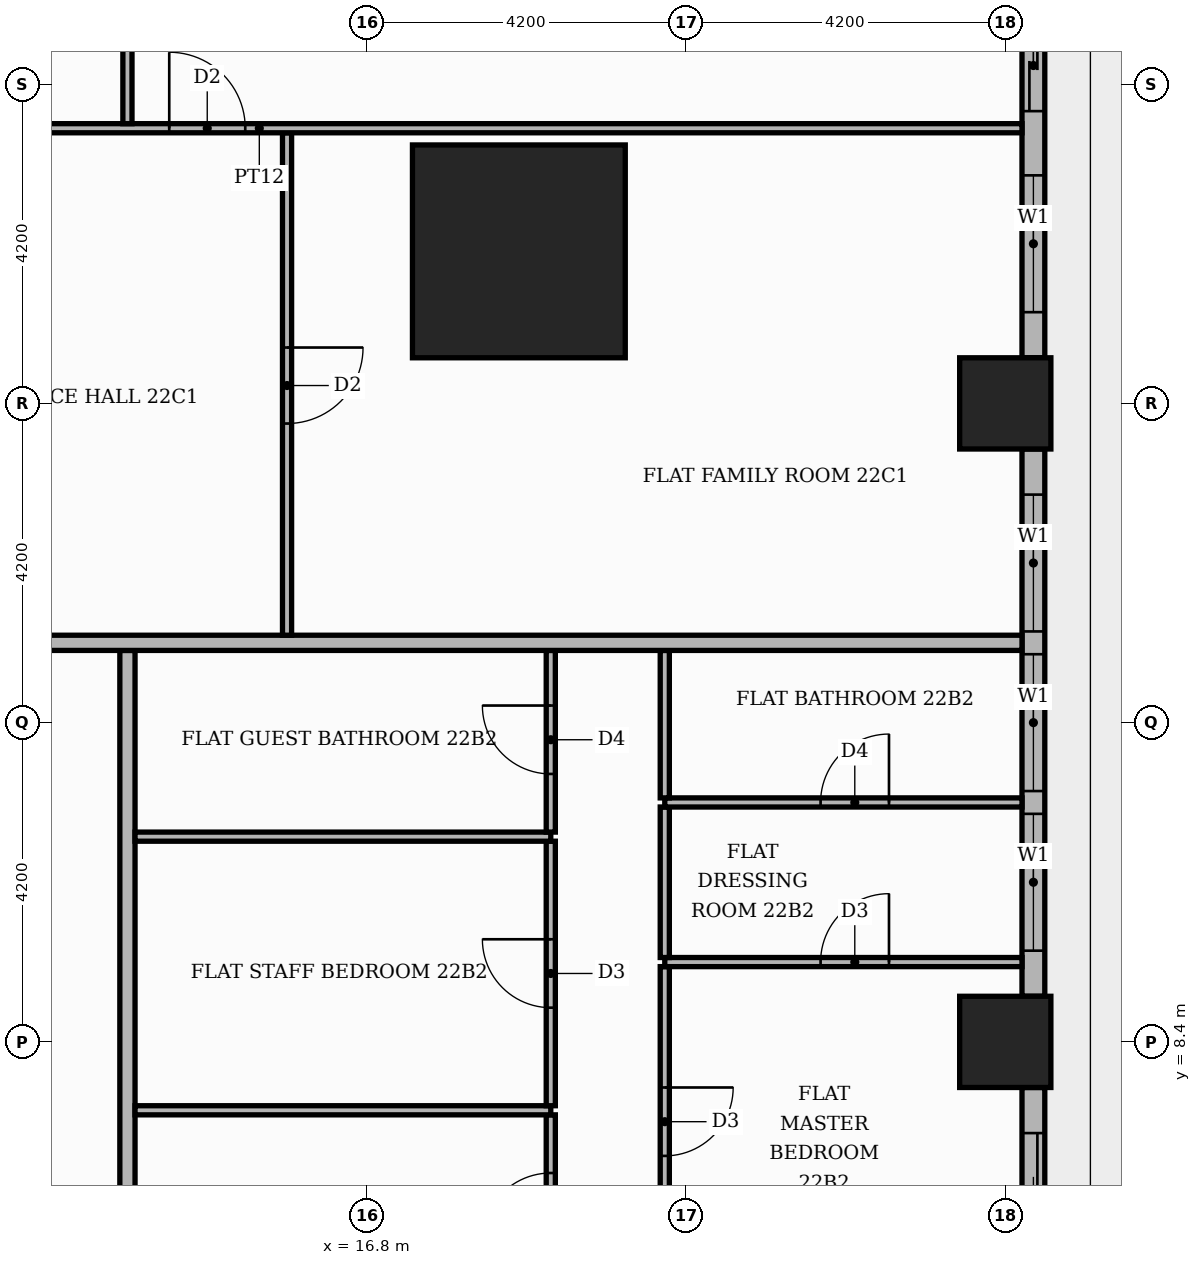
"""IFC4 building model, lengths in metres.
Left out: names, types, materials, properties, quantities, classifications, styles, units other than length and angle.
Written with IfcOpenShell. Run it as: python <this file> out.ifc"""

import sys

from ifc_helpers import new_model, si_unit, direction, frame, frame_2d, origin, origin_2d, place, context, subcontext, project, spatial, rectangle, extrude, element, fill, save


model = new_model("IFC4")
c1 = context("Model", 3, precision=1e-05, world=origin(), true_north=direction((0.0, 1.0)))
c2 = subcontext(c1, "Body", "Model", "MODEL_VIEW")
j1 = project(units=[si_unit("LENGTHUNIT", "METRE"), si_unit("PLANEANGLEUNIT", "RADIAN")], contexts=[c1])
p1 = place(None, origin())
s1 = spatial("IfcSite", under=j1, at=p1, CompositionType="ELEMENT")
p2 = place(p1, origin())
s2 = spatial("IfcBuilding", under=s1, at=p2, CompositionType="ELEMENT")
p3 = place(p2, frame((0.0, 0.0, 94.8)))
s3 = spatial("IfcBuildingStorey", under=s2, at=p3, CompositionType="ELEMENT", Elevation=94.8)
p4 = place(p3, frame((18.8, 18.8, 0.0), z_axis=(0.0, 0.0, 1.0), x_axis=(1.0, 0.0, 0.0)))
e1 = element("IfcColumn", 1, at=p4, inside=s3, PredefinedType="COLUMN", context=c2, shape_type="SweptSolid", body=[
    extrude(rectangle(XDim=2.8, YDim=2.8, at=origin_2d()), origin(), (0.0, 0.0, 1.0), 3.9),
])
for number, where, z_axis, x_axis in (
    (2, (25.2, 8.4, 0.0), (0.0, 0.0, 1.0), (1.0, 0.0, 0.0)),
    (3, (25.2, 16.8, 0.0), (0.0, 0.0, 1.0), (1.0, 0.0, 0.0)),
):
    element("IfcColumn", number, at=place(p3, frame(where, z_axis=z_axis, x_axis=x_axis)), inside=s3, PredefinedType="COLUMN", context=c2, shape_type="SweptSolid", body=[
        extrude(rectangle(XDim=1.2, YDim=1.2, at=origin_2d()), origin(), (0.0, 0.0, 1.0), 3.9),
    ])
p5 = place(p3, frame((25.57, 0.6, 0.0), z_axis=(0.0, 0.0, 1.0), x_axis=(0.0, 1.0, 0.0)))
e4 = element("IfcWall", 4, at=p5, inside=s3, PredefinedType="STANDARD", context=c2, shape_type="SweptSolid", body=[
    extrude(rectangle(XDim=7.2, YDim=0.3, at=frame_2d((3.6, 0.0))), origin(), (0.0, 0.0, 1.0), 3.48),
])
p6 = place(p5, frame((0.6, 0.0, 0.9)))
e5 = element("IfcOpeningElement", 5, at=p6, cuts=e4, PredefinedType="OPENING", context=c2, shape_type="SweptSolid", body=[
    extrude(rectangle(XDim=1.8, YDim=2.1, at=frame_2d((0.9, 1.05))), frame((0.0, 0.16, 0.0), z_axis=(0.0, -1.0, 0.0), x_axis=(1.0, 0.0, 0.0)), (0.0, 0.0, 1.0), 0.32),
])
p7 = place(p5, frame((2.7, 0.0, 0.9)))
e6 = element("IfcOpeningElement", 6, at=p7, cuts=e4, PredefinedType="OPENING", context=c2, shape_type="SweptSolid", body=[
    extrude(rectangle(XDim=1.8, YDim=2.1, at=frame_2d((0.9, 1.05))), frame((0.0, 0.16, 0.0), z_axis=(0.0, -1.0, 0.0), x_axis=(1.0, 0.0, 0.0)), (0.0, 0.0, 1.0), 0.32),
])
p8 = place(p5, frame((4.8, 0.0, 0.0)))
e7 = element("IfcOpeningElement", 7, at=p8, cuts=e4, PredefinedType="OPENING", context=c2, shape_type="SweptSolid", body=[
    extrude(rectangle(XDim=1.8, YDim=2.4, at=frame_2d((0.9, 1.2))), frame((0.0, 0.16, 0.0), z_axis=(0.0, -1.0, 0.0), x_axis=(1.0, 0.0, 0.0)), (0.0, 0.0, 1.0), 0.32),
])
p9 = place(p3, frame((25.57, 9.0, 0.0), z_axis=(0.0, 0.0, 1.0), x_axis=(0.0, 1.0, 0.0)))
e8 = element("IfcWall", 8, at=p9, inside=s3, PredefinedType="STANDARD", context=c2, shape_type="SweptSolid", body=[
    extrude(rectangle(XDim=7.2, YDim=0.3, at=frame_2d((3.6, 0.0))), origin(), (0.0, 0.0, 1.0), 3.48),
])
p10 = place(p9, frame((0.6, 0.0, 0.9)))
e9 = element("IfcOpeningElement", 9, at=p10, cuts=e8, PredefinedType="OPENING", context=c2, shape_type="SweptSolid", body=[
    extrude(rectangle(XDim=1.8, YDim=2.1, at=frame_2d((0.9, 1.05))), frame((0.0, 0.16, 0.0), z_axis=(0.0, -1.0, 0.0), x_axis=(1.0, 0.0, 0.0)), (0.0, 0.0, 1.0), 0.32),
])
p11 = place(p9, frame((2.7, 0.0, 0.9)))
e10 = element("IfcOpeningElement", 10, at=p11, cuts=e8, PredefinedType="OPENING", context=c2, shape_type="SweptSolid", body=[
    extrude(rectangle(XDim=1.8, YDim=2.1, at=frame_2d((0.9, 1.05))), frame((0.0, 0.16, 0.0), z_axis=(0.0, -1.0, 0.0), x_axis=(1.0, 0.0, 0.0)), (0.0, 0.0, 1.0), 0.32),
])
p12 = place(p9, frame((4.8, 0.0, 0.9)))
e11 = element("IfcOpeningElement", 11, at=p12, cuts=e8, PredefinedType="OPENING", context=c2, shape_type="SweptSolid", body=[
    extrude(rectangle(XDim=1.8, YDim=2.1, at=frame_2d((0.9, 1.05))), frame((0.0, 0.16, 0.0), z_axis=(0.0, -1.0, 0.0), x_axis=(1.0, 0.0, 0.0)), (0.0, 0.0, 1.0), 0.32),
])
p13 = place(p3, frame((25.57, 17.4, 0.0), z_axis=(0.0, 0.0, 1.0), x_axis=(0.0, 1.0, 0.0)))
e12 = element("IfcWall", 12, at=p13, inside=s3, PredefinedType="STANDARD", context=c2, shape_type="SweptSolid", body=[
    extrude(rectangle(XDim=4.82, YDim=0.3, at=frame_2d((2.41, 0.0))), origin(), (0.0, 0.0, 1.0), 3.48),
])
p14 = place(p13, frame((0.6, 0.0, 0.9)))
e13 = element("IfcOpeningElement", 13, at=p14, cuts=e12, PredefinedType="OPENING", context=c2, shape_type="SweptSolid", body=[
    extrude(rectangle(XDim=1.8, YDim=2.1, at=frame_2d((0.9, 1.05))), frame((0.0, 0.16, 0.0), z_axis=(0.0, -1.0, 0.0), x_axis=(1.0, 0.0, 0.0)), (0.0, 0.0, 1.0), 0.32),
])
p15 = place(p13, frame((3.245, 0.0, 0.0)))
e14 = element("IfcOpeningElement", 14, at=p15, cuts=e12, PredefinedType="OPENING", context=c2, shape_type="SweptSolid", body=[
    extrude(rectangle(XDim=1.2, YDim=2.4, at=frame_2d((0.6, 1.2))), frame((0.0, 0.16, 0.0), z_axis=(0.0, -1.0, 0.0), x_axis=(1.0, 0.0, 0.0)), (0.0, 0.0, 1.0), 0.32),
])
p16 = place(p3, frame((13.65, -5.15, 0.0), z_axis=(0.0, 0.0, 1.0), x_axis=(0.0, 1.0, 0.0)))
e15 = element("IfcWall", 15, at=p16, inside=s3, PredefinedType="PARTITIONING", context=c2, shape_type="SweptSolid", body=[
    extrude(rectangle(XDim=18.7, YDim=0.2, at=frame_2d((9.35, 0.0))), origin(), (0.0, 0.0, 1.0), 3.48),
])
p17 = place(p16, frame((1.45, 0.0, 0.0)))
e16 = element("IfcOpeningElement", 16, at=p17, cuts=e15, PredefinedType="OPENING", context=c2, shape_type="SweptSolid", body=[
    extrude(rectangle(XDim=1.1, YDim=2.4, at=frame_2d((0.55, 1.2))), frame((0.0, 0.11, 0.0), z_axis=(0.0, -1.0, 0.0), x_axis=(1.0, 0.0, 0.0)), (0.0, 0.0, 1.0), 0.22),
])
p18 = place(p3, frame((19.22, 5.01, 0.0), z_axis=(0.0, 0.0, 1.0), x_axis=(0.0, 1.0, 0.0)))
e17 = element("IfcWall", 17, at=p18, inside=s3, PredefinedType="PARTITIONING", context=c2, shape_type="SweptSolid", body=[
    extrude(rectangle(XDim=2.43, YDim=0.12, at=frame_2d((1.215, 0.0))), origin(), (0.0, 0.0, 1.0), 3.48),
])
p19 = place(p18, frame((0.765, 0.0, 0.0)))
e18 = element("IfcOpeningElement", 18, at=p19, cuts=e17, PredefinedType="OPENING", context=c2, shape_type="SweptSolid", body=[
    extrude(rectangle(XDim=0.9, YDim=2.1, at=frame_2d((0.45, 1.05))), frame((0.0, 0.07, 0.0), z_axis=(0.0, -1.0, 0.0), x_axis=(1.0, 0.0, 0.0)), (0.0, 0.0, 1.0), 0.14),
])
p20 = place(p3, frame((20.72, 5.31, 0.0), z_axis=(0.0, 0.0, 1.0), x_axis=(0.0, 1.0, 0.0)))
e19 = element("IfcWall", 19, at=p20, inside=s3, PredefinedType="PARTITIONING", context=c2, shape_type="SweptSolid", body=[
    extrude(rectangle(XDim=4.08, YDim=0.12, at=frame_2d((2.04, 0.0))), origin(), (0.0, 0.0, 1.0), 3.48),
])
p21 = place(p20, frame((1.59, 0.0, 0.0)))
e20 = element("IfcOpeningElement", 20, at=p21, cuts=e19, PredefinedType="OPENING", context=c2, shape_type="SweptSolid", body=[
    extrude(rectangle(XDim=0.9, YDim=2.1, at=frame_2d((0.45, 1.05))), frame((0.0, 0.07, 0.0), z_axis=(0.0, -1.0, 0.0), x_axis=(1.0, 0.0, 0.0)), (0.0, 0.0, 1.0), 0.14),
])
p22 = place(p3, frame((13.75, 7.5, 0.0), z_axis=(0.0, 0.0, 1.0), x_axis=(1.0, 0.0, 0.0)))
e21 = element("IfcWall", 21, at=p22, inside=s3, PredefinedType="PARTITIONING", context=c2, shape_type="SweptSolid", body=[
    extrude(rectangle(XDim=5.47, YDim=0.12, at=frame_2d((2.735, 0.0))), origin(), (0.0, 0.0, 1.0), 3.48),
])
p23 = place(p3, frame((19.22, 7.56, 0.0), z_axis=(0.0, 0.0, 1.0), x_axis=(0.0, 1.0, 0.0)))
e22 = element("IfcWall", 22, at=p23, inside=s3, PredefinedType="PARTITIONING", context=c2, shape_type="SweptSolid", body=[
    extrude(rectangle(XDim=3.48, YDim=0.12, at=frame_2d((1.74, 0.0))), origin(), (0.0, 0.0, 1.0), 3.48),
])
p24 = place(p23, frame((1.29, 0.0, 0.0)))
e23 = element("IfcOpeningElement", 23, at=p24, cuts=e22, PredefinedType="OPENING", context=c2, shape_type="SweptSolid", body=[
    extrude(rectangle(XDim=0.9, YDim=2.1, at=frame_2d((0.45, 1.05))), frame((0.0, 0.07, 0.0), z_axis=(0.0, -1.0, 0.0), x_axis=(1.0, 0.0, 0.0)), (0.0, 0.0, 1.0), 0.14),
])
p25 = place(p3, frame((20.72, 9.45, 0.0), z_axis=(0.0, 0.0, 1.0), x_axis=(1.0, 0.0, 0.0)))
e24 = element("IfcWall", 24, at=p25, inside=s3, PredefinedType="PARTITIONING", context=c2, shape_type="SweptSolid", body=[
    extrude(rectangle(XDim=4.7, YDim=0.12, at=frame_2d((2.35, 0.0))), origin(), (0.0, 0.0, 1.0), 3.48),
])
p26 = place(p25, frame((2.05, 0.0, 0.0)))
e25 = element("IfcOpeningElement", 25, at=p26, cuts=e24, PredefinedType="OPENING", context=c2, shape_type="SweptSolid", body=[
    extrude(rectangle(XDim=0.9, YDim=2.1, at=frame_2d((0.45, 1.05))), frame((0.0, 0.07, 0.0), z_axis=(0.0, -1.0, 0.0), x_axis=(1.0, 0.0, 0.0)), (0.0, 0.0, 1.0), 0.14),
])
p27 = place(p3, frame((20.72, 9.51, 0.0), z_axis=(0.0, 0.0, 1.0), x_axis=(0.0, 1.0, 0.0)))
e26 = element("IfcWall", 26, at=p27, inside=s3, PredefinedType="PARTITIONING", context=c2, shape_type="SweptSolid", body=[
    extrude(rectangle(XDim=1.98, YDim=0.12, at=frame_2d((0.99, 0.0))), origin(), (0.0, 0.0, 1.0), 3.48),
])
p28 = place(p3, frame((13.75, 11.1, 0.0), z_axis=(0.0, 0.0, 1.0), x_axis=(1.0, 0.0, 0.0)))
e27 = element("IfcWall", 27, at=p28, inside=s3, PredefinedType="PARTITIONING", context=c2, shape_type="SweptSolid", body=[
    extrude(rectangle(XDim=5.47, YDim=0.12, at=frame_2d((2.735, 0.0))), origin(), (0.0, 0.0, 1.0), 3.48),
])
p29 = place(p3, frame((19.22, 11.16, 0.0), z_axis=(0.0, 0.0, 1.0), x_axis=(0.0, 1.0, 0.0)))
e28 = element("IfcWall", 28, at=p29, inside=s3, PredefinedType="PARTITIONING", context=c2, shape_type="SweptSolid", body=[
    extrude(rectangle(XDim=2.39, YDim=0.12, at=frame_2d((1.195, 0.0))), origin(), (0.0, 0.0, 1.0), 3.48),
])
p30 = place(p29, frame((0.765, 0.0, 0.0)))
e29 = element("IfcOpeningElement", 29, at=p30, cuts=e28, PredefinedType="OPENING", context=c2, shape_type="SweptSolid", body=[
    extrude(rectangle(XDim=0.9, YDim=2.1, at=frame_2d((0.45, 1.05))), frame((0.0, 0.07, 0.0), z_axis=(0.0, -1.0, 0.0), x_axis=(1.0, 0.0, 0.0)), (0.0, 0.0, 1.0), 0.14),
])
p31 = place(p3, frame((20.72, 11.55, 0.0), z_axis=(0.0, 0.0, 1.0), x_axis=(1.0, 0.0, 0.0)))
e30 = element("IfcWall", 30, at=p31, inside=s3, PredefinedType="PARTITIONING", context=c2, shape_type="SweptSolid", body=[
    extrude(rectangle(XDim=4.7, YDim=0.12, at=frame_2d((2.35, 0.0))), origin(), (0.0, 0.0, 1.0), 3.48),
])
p32 = place(p31, frame((2.05, 0.0, 0.0)))
e31 = element("IfcOpeningElement", 31, at=p32, cuts=e30, PredefinedType="OPENING", context=c2, shape_type="SweptSolid", body=[
    extrude(rectangle(XDim=0.9, YDim=2.1, at=frame_2d((0.45, 1.05))), frame((0.0, 0.07, 0.0), z_axis=(0.0, -1.0, 0.0), x_axis=(1.0, 0.0, 0.0)), (0.0, 0.0, 1.0), 0.14),
])
p33 = place(p3, frame((20.72, 11.61, 0.0), z_axis=(0.0, 0.0, 1.0), x_axis=(0.0, 1.0, 0.0)))
e32 = element("IfcWall", 32, at=p33, inside=s3, PredefinedType="PARTITIONING", context=c2, shape_type="SweptSolid", body=[
    extrude(rectangle(XDim=1.94, YDim=0.12, at=frame_2d((0.97, 0.0))), origin(), (0.0, 0.0, 1.0), 3.48),
])
p34 = place(p3, frame((-13.65, 13.65, 0.0), z_axis=(0.0, 0.0, 1.0), x_axis=(1.0, 0.0, 0.0)))
e33 = element("IfcWall", 33, at=p34, inside=s3, PredefinedType="PARTITIONING", context=c2, shape_type="SweptSolid", body=[
    extrude(rectangle(XDim=39.07, YDim=0.2, at=frame_2d((19.535, 0.0))), origin(), (0.0, 0.0, 1.0), 3.48),
])
p35 = place(p34, frame((24.65, 0.0, 0.0)))
e34 = element("IfcOpeningElement", 34, at=p35, cuts=e33, PredefinedType="OPENING", context=c2, shape_type="SweptSolid", body=[
    extrude(rectangle(XDim=1.1, YDim=2.4, at=frame_2d((0.55, 1.2))), frame((0.0, 0.11, 0.0), z_axis=(0.0, -1.0, 0.0), x_axis=(1.0, 0.0, 0.0)), (0.0, 0.0, 1.0), 0.22),
])
p36 = place(p34, frame((16.25, 0.0, 0.0)))
e35 = element("IfcOpeningElement", 35, at=p36, cuts=e33, PredefinedType="OPENING", context=c2, shape_type="SweptSolid", body=[
    extrude(rectangle(XDim=1.1, YDim=2.4, at=frame_2d((0.55, 1.2))), frame((0.0, 0.11, 0.0), z_axis=(0.0, -1.0, 0.0), x_axis=(1.0, 0.0, 0.0)), (0.0, 0.0, 1.0), 0.22),
])
p37 = place(p3, frame((15.75, 13.75, 0.0), z_axis=(0.0, 0.0, 1.0), x_axis=(0.0, 1.0, 0.0)))
e36 = element("IfcWall", 36, at=p37, inside=s3, PredefinedType="PARTITIONING", context=c2, shape_type="SweptSolid", body=[
    extrude(rectangle(XDim=6.61, YDim=0.12, at=frame_2d((3.305, 0.0))), origin(), (0.0, 0.0, 1.0), 3.48),
])
p38 = place(p37, frame((2.785, 0.0, 0.0)))
e37 = element("IfcOpeningElement", 37, at=p38, cuts=e36, PredefinedType="OPENING", context=c2, shape_type="SweptSolid", body=[
    extrude(rectangle(XDim=1.0, YDim=2.1, at=frame_2d((0.5, 1.05))), frame((0.0, 0.07, 0.0), z_axis=(0.0, -1.0, 0.0), x_axis=(1.0, 0.0, 0.0)), (0.0, 0.0, 1.0), 0.14),
])
p39 = place(p3, frame((5.35, 20.42, 0.0), z_axis=(0.0, 0.0, 1.0), x_axis=(1.0, 0.0, 0.0)))
e38 = element("IfcWall", 38, at=p39, inside=s3, PredefinedType="PARTITIONING", context=c2, shape_type="SweptSolid", body=[
    extrude(rectangle(XDim=20.07, YDim=0.12, at=frame_2d((10.035, 0.0))), origin(), (0.0, 0.0, 1.0), 3.48),
])
p40 = place(p39, frame((8.85, 0.0, 0.0)))
e39 = element("IfcOpeningElement", 39, at=p40, cuts=e38, PredefinedType="OPENING", context=c2, shape_type="SweptSolid", body=[
    extrude(rectangle(XDim=1.0, YDim=2.1, at=frame_2d((0.5, 1.05))), frame((0.0, 0.07, 0.0), z_axis=(0.0, -1.0, 0.0), x_axis=(1.0, 0.0, 0.0)), (0.0, 0.0, 1.0), 0.14),
])
p41 = place(p39, frame((5.75, 0.0, 0.0)))
e40 = element("IfcOpeningElement", 40, at=p41, cuts=e38, PredefinedType="OPENING", context=c2, shape_type="SweptSolid", body=[
    extrude(rectangle(XDim=0.9, YDim=2.1, at=frame_2d((0.45, 1.05))), frame((0.0, 0.07, 0.0), z_axis=(0.0, -1.0, 0.0), x_axis=(1.0, 0.0, 0.0)), (0.0, 0.0, 1.0), 0.14),
])
p42 = place(p3, frame((13.65, 20.48, 0.0), z_axis=(0.0, 0.0, 1.0), x_axis=(0.0, 1.0, 0.0)))
e41 = element("IfcWall", 41, at=p42, inside=s3, PredefinedType="PARTITIONING", context=c2, shape_type="SweptSolid", body=[
    extrude(rectangle(XDim=4.94, YDim=0.12, at=frame_2d((2.47, 0.0))), origin(), (0.0, 0.0, 1.0), 3.48),
])
p43 = place(p8, origin())
e42 = element("IfcDoor", 42, at=p43, inside=s3, OperationType="SLIDING_TO_RIGHT", PredefinedType="DOOR", context=c2, shape_type="SweptSolid", body=[
    extrude(rectangle(XDim=1.8, YDim=2.4, at=frame_2d((0.9, 1.2))), frame((0.0, 0.025, 0.0), z_axis=(0.0, -1.0, 0.0), x_axis=(1.0, 0.0, 0.0)), (0.0, 0.0, 1.0), 0.05),
])
fill(e7, e42)
p44 = place(p10, origin())
e43 = element("IfcWindow", 43, at=p44, inside=s3, PartitioningType="SINGLE_PANEL", PredefinedType="WINDOW", context=c2, shape_type="SweptSolid", body=[
    extrude(rectangle(XDim=1.8, YDim=2.1, at=frame_2d((0.9, 1.05))), frame((0.0, 0.03, 0.0), z_axis=(0.0, -1.0, 0.0), x_axis=(1.0, 0.0, 0.0)), (0.0, 0.0, 1.0), 0.06),
])
fill(e9, e43)
p45 = place(p11, origin())
e44 = element("IfcWindow", 44, at=p45, inside=s3, PartitioningType="SINGLE_PANEL", PredefinedType="WINDOW", context=c2, shape_type="SweptSolid", body=[
    extrude(rectangle(XDim=1.8, YDim=2.1, at=frame_2d((0.9, 1.05))), frame((0.0, 0.03, 0.0), z_axis=(0.0, -1.0, 0.0), x_axis=(1.0, 0.0, 0.0)), (0.0, 0.0, 1.0), 0.06),
])
fill(e10, e44)
p46 = place(p12, origin())
e45 = element("IfcWindow", 45, at=p46, inside=s3, PartitioningType="SINGLE_PANEL", PredefinedType="WINDOW", context=c2, shape_type="SweptSolid", body=[
    extrude(rectangle(XDim=1.8, YDim=2.1, at=frame_2d((0.9, 1.05))), frame((0.0, 0.03, 0.0), z_axis=(0.0, -1.0, 0.0), x_axis=(1.0, 0.0, 0.0)), (0.0, 0.0, 1.0), 0.06),
])
fill(e11, e45)
p47 = place(p14, origin())
e46 = element("IfcWindow", 46, at=p47, inside=s3, PartitioningType="SINGLE_PANEL", PredefinedType="WINDOW", context=c2, shape_type="SweptSolid", body=[
    extrude(rectangle(XDim=1.8, YDim=2.1, at=frame_2d((0.9, 1.05))), frame((0.0, 0.03, 0.0), z_axis=(0.0, -1.0, 0.0), x_axis=(1.0, 0.0, 0.0)), (0.0, 0.0, 1.0), 0.06),
])
fill(e13, e46)
p48 = place(p15, origin())
e47 = element("IfcDoor", 47, at=p48, inside=s3, OperationType="SLIDING_TO_RIGHT", PredefinedType="DOOR", context=c2, shape_type="SweptSolid", body=[
    extrude(rectangle(XDim=1.2, YDim=2.4, at=frame_2d((0.6, 1.2))), frame((0.0, 0.025, 0.0), z_axis=(0.0, -1.0, 0.0), x_axis=(1.0, 0.0, 0.0)), (0.0, 0.0, 1.0), 0.05),
])
fill(e14, e47)
p49 = place(p19, origin())
e48 = element("IfcDoor", 48, at=p49, inside=s3, OperationType="SINGLE_SWING_LEFT", PredefinedType="DOOR", context=c2, shape_type="SweptSolid", body=[
    extrude(rectangle(XDim=0.9, YDim=2.1, at=frame_2d((0.45, 1.05))), frame((0.0, 0.025, 0.0), z_axis=(0.0, -1.0, 0.0), x_axis=(1.0, 0.0, 0.0)), (0.0, 0.0, 1.0), 0.05),
])
fill(e18, e48)
p50 = place(p24, origin())
e49 = element("IfcDoor", 49, at=p50, inside=s3, OperationType="SINGLE_SWING_RIGHT", PredefinedType="DOOR", context=c2, shape_type="SweptSolid", body=[
    extrude(rectangle(XDim=0.9, YDim=2.1, at=frame_2d((0.45, 1.05))), frame((0.0, 0.025, 0.0), z_axis=(0.0, -1.0, 0.0), x_axis=(1.0, 0.0, 0.0)), (0.0, 0.0, 1.0), 0.05),
])
fill(e23, e49)
p51 = place(p30, origin())
e50 = element("IfcDoor", 50, at=p51, inside=s3, OperationType="SINGLE_SWING_RIGHT", PredefinedType="DOOR", context=c2, shape_type="SweptSolid", body=[
    extrude(rectangle(XDim=0.9, YDim=2.1, at=frame_2d((0.45, 1.05))), frame((0.0, 0.025, 0.0), z_axis=(0.0, -1.0, 0.0), x_axis=(1.0, 0.0, 0.0)), (0.0, 0.0, 1.0), 0.05),
])
fill(e29, e50)
p52 = place(p21, frame((0.9, 0.0, 0.0), z_axis=(0.0, 0.0, 1.0), x_axis=(-1.0, 0.0, 0.0)))
e51 = element("IfcDoor", 51, at=p52, inside=s3, OperationType="SINGLE_SWING_RIGHT", PredefinedType="DOOR", context=c2, shape_type="SweptSolid", body=[
    extrude(rectangle(XDim=0.9, YDim=2.1, at=frame_2d((0.45, 1.05))), frame((0.0, 0.025, 0.0), z_axis=(0.0, -1.0, 0.0), x_axis=(1.0, 0.0, 0.0)), (0.0, 0.0, 1.0), 0.05),
])
fill(e20, e51)
p53 = place(p26, origin())
e52 = element("IfcDoor", 52, at=p53, inside=s3, OperationType="SINGLE_SWING_RIGHT", PredefinedType="DOOR", context=c2, shape_type="SweptSolid", body=[
    extrude(rectangle(XDim=0.9, YDim=2.1, at=frame_2d((0.45, 1.05))), frame((0.0, 0.025, 0.0), z_axis=(0.0, -1.0, 0.0), x_axis=(1.0, 0.0, 0.0)), (0.0, 0.0, 1.0), 0.05),
])
fill(e25, e52)
p54 = place(p32, origin())
e53 = element("IfcDoor", 53, at=p54, inside=s3, OperationType="SINGLE_SWING_RIGHT", PredefinedType="DOOR", context=c2, shape_type="SweptSolid", body=[
    extrude(rectangle(XDim=0.9, YDim=2.1, at=frame_2d((0.45, 1.05))), frame((0.0, 0.025, 0.0), z_axis=(0.0, -1.0, 0.0), x_axis=(1.0, 0.0, 0.0)), (0.0, 0.0, 1.0), 0.05),
])
fill(e31, e53)
p55 = place(p38, frame((1.0, 0.0, 0.0), z_axis=(0.0, 0.0, 1.0), x_axis=(-1.0, 0.0, 0.0)))
e54 = element("IfcDoor", 54, at=p55, inside=s3, OperationType="SINGLE_SWING_RIGHT", PredefinedType="DOOR", context=c2, shape_type="SweptSolid", body=[
    extrude(rectangle(XDim=1.0, YDim=2.1, at=frame_2d((0.5, 1.05))), frame((0.0, 0.025, 0.0), z_axis=(0.0, -1.0, 0.0), x_axis=(1.0, 0.0, 0.0)), (0.0, 0.0, 1.0), 0.05),
])
fill(e37, e54)
p56 = place(p40, origin())
e55 = element("IfcDoor", 55, at=p56, inside=s3, OperationType="SINGLE_SWING_LEFT", PredefinedType="DOOR", context=c2, shape_type="SweptSolid", body=[
    extrude(rectangle(XDim=1.0, YDim=2.1, at=frame_2d((0.5, 1.05))), frame((0.0, 0.025, 0.0), z_axis=(0.0, -1.0, 0.0), x_axis=(1.0, 0.0, 0.0)), (0.0, 0.0, 1.0), 0.05),
])
fill(e39, e55)
save(model, sys.argv[1])
